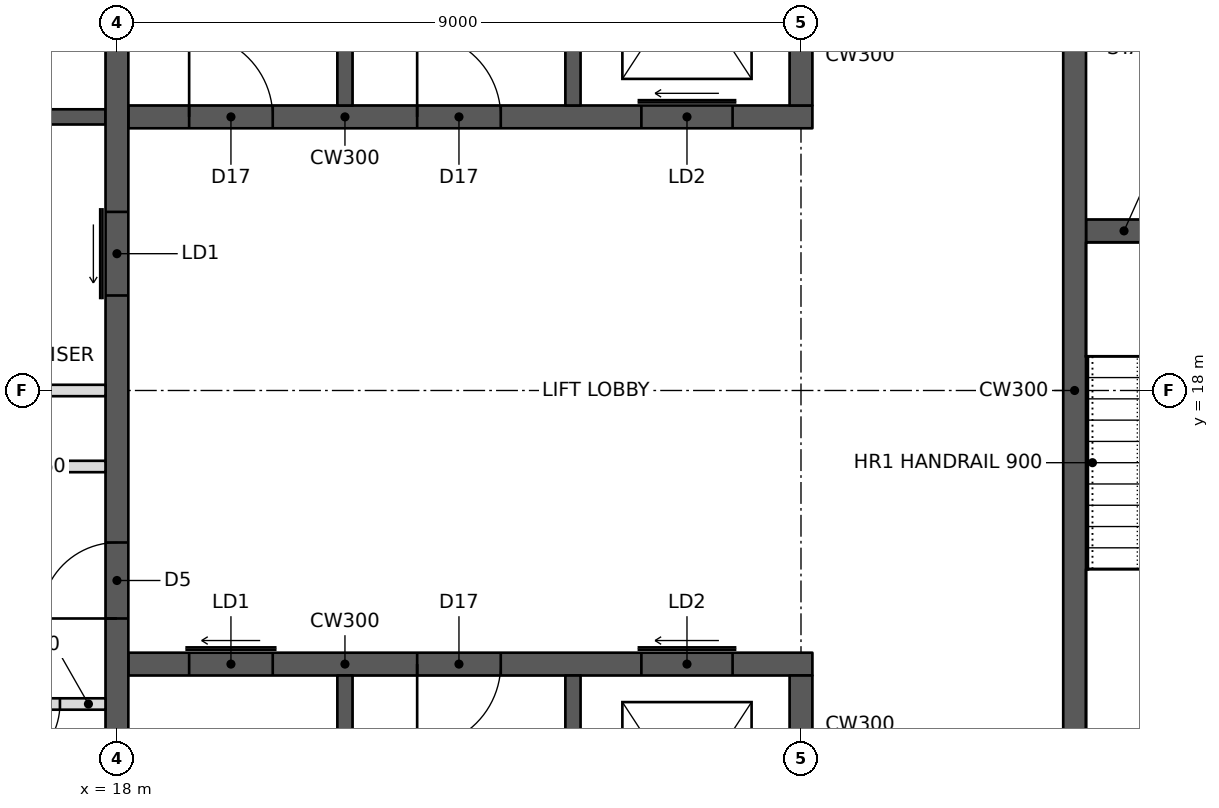
"""IFC4 building model, lengths in metres.
Left out: names, types, materials, properties, quantities, classifications, styles, units other than length and angle.
Written with IfcOpenShell. Run it as: python <this file> out.ifc"""

import sys

from ifc_helpers import new_model, si_unit, direction, frame, frame_2d, origin, place, context, subcontext, project, spatial, rectangle, extrude, element, fill, save


model = new_model("IFC4")
c1 = context("Model", 3, precision=1e-05, world=origin(), true_north=direction((0.0, 1.0)))
c2 = subcontext(c1, "Body", "Model", "MODEL_VIEW")
j1 = project(units=[si_unit("LENGTHUNIT", "METRE"), si_unit("PLANEANGLEUNIT", "RADIAN")], contexts=[c1])
p1 = place(None, origin())
s1 = spatial("IfcSite", under=j1, at=p1, CompositionType="ELEMENT")
p2 = place(p1, origin())
s2 = spatial("IfcBuilding", under=s1, at=p2, CompositionType="ELEMENT")
p3 = place(p2, frame((0.0, 0.0, 241.0)))
s3 = spatial("IfcBuildingStorey", under=s2, at=p3, CompositionType="ELEMENT", Elevation=241.0)
p4 = place(p3, frame((18.0, 11.4, 0.0), z_axis=(0.0, 0.0, 1.0), x_axis=(0.0, 1.0, 0.0)))
e1 = element("IfcWall", 1, at=p4, inside=s3, PredefinedType="SHEAR", context=c2, shape_type="SweptSolid", body=[
    extrude(rectangle(XDim=13.2, YDim=0.3, at=frame_2d((6.6, 0.0))), origin(), (0.0, 0.0, 1.0), 3.6),
])
p5 = place(p4, frame((3.6, 0.0, 0.0)))
e2 = element("IfcOpeningElement", 2, at=p5, cuts=e1, PredefinedType="OPENING", context=c2, shape_type="SweptSolid", body=[
    extrude(rectangle(XDim=1.0, YDim=2.1, at=frame_2d((0.5, 1.05))), frame((0.0, 0.16, 0.0), z_axis=(0.0, -1.0, 0.0), x_axis=(1.0, 0.0, 0.0)), (0.0, 0.0, 1.0), 0.32),
])
p6 = place(p4, frame((7.85, 0.0, 0.0)))
e3 = element("IfcOpeningElement", 3, at=p6, cuts=e1, PredefinedType="OPENING", context=c2, shape_type="SweptSolid", body=[
    extrude(rectangle(XDim=1.1, YDim=2.1, at=frame_2d((0.55, 1.05))), frame((0.0, 0.16, 0.0), z_axis=(0.0, -1.0, 0.0), x_axis=(1.0, 0.0, 0.0)), (0.0, 0.0, 1.0), 0.32),
])
p7 = place(p3, frame((14.55, 18.0, 0.0), z_axis=(0.0, 0.0, 1.0), x_axis=(1.0, 0.0, 0.0)))
e4 = element("IfcWall", 4, at=p7, inside=s3, PredefinedType="PARTITIONING", context=c2, shape_type="SweptSolid", body=[
    extrude(rectangle(XDim=3.3, YDim=0.15, at=frame_2d((1.65, 0.0))), origin(), (0.0, 0.0, 1.0), 3.4),
])
p8 = place(p3, frame((18.15, 14.4, 0.0), z_axis=(0.0, 0.0, 1.0), x_axis=(1.0, 0.0, 0.0)))
e5 = element("IfcWall", 5, at=p8, inside=s3, PredefinedType="SHEAR", context=c2, shape_type="SweptSolid", body=[
    extrude(rectangle(XDim=9.0, YDim=0.3, at=frame_2d((4.5, 0.0))), origin(), (0.0, 0.0, 1.0), 3.6),
])
p9 = place(p8, frame((0.8, 0.0, 0.0)))
e6 = element("IfcOpeningElement", 6, at=p9, cuts=e5, PredefinedType="OPENING", context=c2, shape_type="SweptSolid", body=[
    extrude(rectangle(XDim=1.1, YDim=2.1, at=frame_2d((0.55, 1.05))), frame((0.0, 0.16, 0.0), z_axis=(0.0, -1.0, 0.0), x_axis=(1.0, 0.0, 0.0)), (0.0, 0.0, 1.0), 0.32),
])
p10 = place(p8, frame((6.75, 0.0, 0.0)))
e7 = element("IfcOpeningElement", 7, at=p10, cuts=e5, PredefinedType="OPENING", context=c2, shape_type="SweptSolid", body=[
    extrude(rectangle(XDim=1.2, YDim=2.1, at=frame_2d((0.6, 1.05))), frame((0.0, 0.16, 0.0), z_axis=(0.0, -1.0, 0.0), x_axis=(1.0, 0.0, 0.0)), (0.0, 0.0, 1.0), 0.32),
])
p11 = place(p8, frame((3.8, 0.0, 0.0)))
e8 = element("IfcOpeningElement", 8, at=p11, cuts=e5, PredefinedType="OPENING", context=c2, shape_type="SweptSolid", body=[
    extrude(rectangle(XDim=1.1, YDim=2.1, at=frame_2d((0.55, 1.05))), frame((0.0, 0.16, 0.0), z_axis=(0.0, -1.0, 0.0), x_axis=(1.0, 0.0, 0.0)), (0.0, 0.0, 1.0), 0.32),
])
p12 = place(p3, frame((27.0, 11.4, 0.0), z_axis=(0.0, 0.0, 1.0), x_axis=(0.0, 1.0, 0.0)))
e9 = element("IfcWall", 9, at=p12, inside=s3, PredefinedType="SHEAR", context=c2, shape_type="SweptSolid", body=[
    extrude(rectangle(XDim=2.85, YDim=0.3, at=frame_2d((1.425, 0.0))), origin(), (0.0, 0.0, 1.0), 3.6),
])
for number, where, z_axis, x_axis in (
    (10, (21.0, 11.4, 0.0), (0.0, 0.0, 1.0), (0.0, 1.0, 0.0)),
    (11, (24.0, 11.4, 0.0), (0.0, 0.0, 1.0), (0.0, 1.0, 0.0)),
):
    element("IfcWall", number, at=place(p3, frame(where, z_axis=z_axis, x_axis=x_axis)), inside=s3, PredefinedType="SHEAR", context=c2, shape_type="SweptSolid", body=[
        extrude(rectangle(XDim=2.85, YDim=0.2, at=frame_2d((1.425, 0.0))), origin(), (0.0, 0.0, 1.0), 3.6),
    ])
p13 = place(p3, frame((18.15, 21.6, 0.0), z_axis=(0.0, 0.0, 1.0), x_axis=(1.0, 0.0, 0.0)))
e12 = element("IfcWall", 12, at=p13, inside=s3, PredefinedType="SHEAR", context=c2, shape_type="SweptSolid", body=[
    extrude(rectangle(XDim=9.0, YDim=0.3, at=frame_2d((4.5, 0.0))), origin(), (0.0, 0.0, 1.0), 3.6),
])
p14 = place(p13, frame((6.75, 0.0, 0.0)))
e13 = element("IfcOpeningElement", 13, at=p14, cuts=e12, PredefinedType="OPENING", context=c2, shape_type="SweptSolid", body=[
    extrude(rectangle(XDim=1.2, YDim=2.1, at=frame_2d((0.6, 1.05))), frame((0.0, 0.16, 0.0), z_axis=(0.0, -1.0, 0.0), x_axis=(1.0, 0.0, 0.0)), (0.0, 0.0, 1.0), 0.32),
])
p15 = place(p13, frame((0.8, 0.0, 0.0)))
e14 = element("IfcOpeningElement", 14, at=p15, cuts=e12, PredefinedType="OPENING", context=c2, shape_type="SweptSolid", body=[
    extrude(rectangle(XDim=1.1, YDim=2.1, at=frame_2d((0.55, 1.05))), frame((0.0, 0.16, 0.0), z_axis=(0.0, -1.0, 0.0), x_axis=(1.0, 0.0, 0.0)), (0.0, 0.0, 1.0), 0.32),
])
p16 = place(p13, frame((3.8, 0.0, 0.0)))
e15 = element("IfcOpeningElement", 15, at=p16, cuts=e12, PredefinedType="OPENING", context=c2, shape_type="SweptSolid", body=[
    extrude(rectangle(XDim=1.1, YDim=2.1, at=frame_2d((0.55, 1.05))), frame((0.0, 0.16, 0.0), z_axis=(0.0, -1.0, 0.0), x_axis=(1.0, 0.0, 0.0)), (0.0, 0.0, 1.0), 0.32),
])
p17 = place(p3, frame((27.0, 21.75, 0.0), z_axis=(0.0, 0.0, 1.0), x_axis=(0.0, 1.0, 0.0)))
e16 = element("IfcWall", 16, at=p17, inside=s3, PredefinedType="SHEAR", context=c2, shape_type="SweptSolid", body=[
    extrude(rectangle(XDim=2.85, YDim=0.3, at=frame_2d((1.425, 0.0))), origin(), (0.0, 0.0, 1.0), 3.6),
])
for number, where, z_axis, x_axis in (
    (17, (21.0, 21.75, 0.0), (0.0, 0.0, 1.0), (0.0, 1.0, 0.0)),
    (18, (24.0, 21.75, 0.0), (0.0, 0.0, 1.0), (0.0, 1.0, 0.0)),
):
    element("IfcWall", number, at=place(p3, frame(where, z_axis=z_axis, x_axis=x_axis)), inside=s3, PredefinedType="SHEAR", context=c2, shape_type="SweptSolid", body=[
        extrude(rectangle(XDim=2.85, YDim=0.2, at=frame_2d((1.425, 0.0))), origin(), (0.0, 0.0, 1.0), 3.6),
    ])
p18 = place(p3, frame((30.6, 11.4, 0.0), z_axis=(0.0, 0.0, 1.0), x_axis=(0.0, 1.0, 0.0)))
e19 = element("IfcWall", 19, at=p18, inside=s3, PredefinedType="SHEAR", context=c2, shape_type="SweptSolid", body=[
    extrude(rectangle(XDim=13.2, YDim=0.3, at=frame_2d((6.6, 0.0))), origin(), (0.0, 0.0, 1.0), 3.6),
])
p19 = place(p3, frame((30.75, 20.1, 0.0), z_axis=(0.0, 0.0, 1.0), x_axis=(1.0, 0.0, 0.0)))
e20 = element("IfcWall", 20, at=p19, inside=s3, PredefinedType="SHEAR", context=c2, shape_type="SweptSolid", body=[
    extrude(rectangle(XDim=2.85, YDim=0.3, at=frame_2d((1.425, 0.0))), origin(), (0.0, 0.0, 1.0), 3.6),
])
p20 = place(p19, frame((1.15, 0.0, 0.0)))
e21 = element("IfcOpeningElement", 21, at=p20, cuts=e20, PredefinedType="OPENING", context=c2, shape_type="SweptSolid", body=[
    extrude(rectangle(XDim=1.0, YDim=2.1, at=frame_2d((0.5, 1.05))), frame((0.0, 0.16, 0.0), z_axis=(0.0, -1.0, 0.0), x_axis=(1.0, 0.0, 0.0)), (0.0, 0.0, 1.0), 0.32),
])
p21 = place(p3, frame((14.55, 21.6, 0.0), z_axis=(0.0, 0.0, 1.0), x_axis=(1.0, 0.0, 0.0)))
e22 = element("IfcWall", 22, at=p21, inside=s3, PredefinedType="SHEAR", context=c2, shape_type="SweptSolid", body=[
    extrude(rectangle(XDim=3.3, YDim=0.2, at=frame_2d((1.65, 0.0))), origin(), (0.0, 0.0, 1.0), 3.6),
])
p22 = place(p3, frame((14.55, 17.0, 0.0), z_axis=(0.0, 0.0, 1.0), x_axis=(1.0, 0.0, 0.0)))
e23 = element("IfcWall", 23, at=p22, inside=s3, PredefinedType="PARTITIONING", context=c2, shape_type="SweptSolid", body=[
    extrude(rectangle(XDim=3.3, YDim=0.15, at=frame_2d((1.65, 0.0))), origin(), (0.0, 0.0, 1.0), 3.4),
])
p23 = place(p22, frame((0.3, 0.0, 0.0)))
e24 = element("IfcOpeningElement", 24, at=p23, cuts=e23, PredefinedType="OPENING", context=c2, shape_type="SweptSolid", body=[
    extrude(rectangle(XDim=1.0, YDim=2.1, at=frame_2d((0.5, 1.05))), frame((0.0, 0.085, 0.0), z_axis=(0.0, -1.0, 0.0), x_axis=(1.0, 0.0, 0.0)), (0.0, 0.0, 1.0), 0.17),
])
p24 = place(p3, frame((14.55, 13.875, 0.0), z_axis=(0.0, 0.0, 1.0), x_axis=(1.0, 0.0, 0.0)))
e25 = element("IfcWall", 25, at=p24, inside=s3, PredefinedType="PARTITIONING", context=c2, shape_type="SweptSolid", body=[
    extrude(rectangle(XDim=3.3, YDim=0.15, at=frame_2d((1.65, 0.0))), origin(), (0.0, 0.0, 1.0), 3.4),
])
p25 = place(p24, frame((0.2, 0.0, 0.0)))
e26 = element("IfcOpeningElement", 26, at=p25, cuts=e25, PredefinedType="OPENING", context=c2, shape_type="SweptSolid", body=[
    extrude(rectangle(XDim=0.9, YDim=2.1, at=frame_2d((0.45, 1.05))), frame((0.0, 0.085, 0.0), z_axis=(0.0, -1.0, 0.0), x_axis=(1.0, 0.0, 0.0)), (0.0, 0.0, 1.0), 0.17),
])
p26 = place(p24, frame((1.8, 0.0, 0.0)))
e27 = element("IfcOpeningElement", 27, at=p26, cuts=e25, PredefinedType="OPENING", context=c2, shape_type="SweptSolid", body=[
    extrude(rectangle(XDim=0.9, YDim=2.1, at=frame_2d((0.45, 1.05))), frame((0.0, 0.085, 0.0), z_axis=(0.0, -1.0, 0.0), x_axis=(1.0, 0.0, 0.0)), (0.0, 0.0, 1.0), 0.17),
])
p27 = place(p26, frame((0.9, 0.0, 0.0), z_axis=(0.0, 0.0, 1.0), x_axis=(-1.0, 0.0, 0.0)))
e28 = element("IfcDoor", 28, at=p27, inside=s3, OperationType="SINGLE_SWING_RIGHT", PredefinedType="DOOR", context=c2, shape_type="SweptSolid", body=[
    extrude(rectangle(XDim=0.9, YDim=2.1, at=frame_2d((0.45, 1.05))), frame((0.0, 0.025, 0.0), z_axis=(0.0, -1.0, 0.0), x_axis=(1.0, 0.0, 0.0)), (0.0, 0.0, 1.0), 0.05),
])
fill(e27, e28)
p28 = place(p5, origin())
e29 = element("IfcDoor", 29, at=p28, inside=s3, OperationType="SINGLE_SWING_LEFT", PredefinedType="DOOR", context=c2, shape_type="SweptSolid", body=[
    extrude(rectangle(XDim=1.0, YDim=2.1, at=frame_2d((0.5, 1.05))), frame((0.0, 0.025, 0.0), z_axis=(0.0, -1.0, 0.0), x_axis=(1.0, 0.0, 0.0)), (0.0, 0.0, 1.0), 0.05),
])
fill(e2, e29)
p29 = place(p9, origin())
e30 = element("IfcDoor", 30, at=p29, inside=s3, OperationType="SLIDING_TO_LEFT", PredefinedType="DOOR", context=c2, shape_type="SweptSolid", body=[
    extrude(rectangle(XDim=1.1, YDim=2.1, at=frame_2d((0.55, 1.05))), frame((0.0, 0.025, 0.0), z_axis=(0.0, -1.0, 0.0), x_axis=(1.0, 0.0, 0.0)), (0.0, 0.0, 1.0), 0.05),
])
fill(e6, e30)
p30 = place(p6, origin())
e31 = element("IfcDoor", 31, at=p30, inside=s3, OperationType="SLIDING_TO_LEFT", PredefinedType="DOOR", context=c2, shape_type="SweptSolid", body=[
    extrude(rectangle(XDim=1.1, YDim=2.1, at=frame_2d((0.55, 1.05))), frame((0.0, 0.025, 0.0), z_axis=(0.0, -1.0, 0.0), x_axis=(1.0, 0.0, 0.0)), (0.0, 0.0, 1.0), 0.05),
])
fill(e3, e31)
p31 = place(p10, origin())
e32 = element("IfcDoor", 32, at=p31, inside=s3, OperationType="SLIDING_TO_LEFT", PredefinedType="DOOR", context=c2, shape_type="SweptSolid", body=[
    extrude(rectangle(XDim=1.2, YDim=2.1, at=frame_2d((0.6, 1.05))), frame((0.0, 0.025, 0.0), z_axis=(0.0, -1.0, 0.0), x_axis=(1.0, 0.0, 0.0)), (0.0, 0.0, 1.0), 0.05),
])
fill(e7, e32)
p32 = place(p14, origin())
e33 = element("IfcDoor", 33, at=p32, inside=s3, OperationType="SLIDING_TO_LEFT", PredefinedType="DOOR", context=c2, shape_type="SweptSolid", body=[
    extrude(rectangle(XDim=1.2, YDim=2.1, at=frame_2d((0.6, 1.05))), frame((0.0, 0.025, 0.0), z_axis=(0.0, -1.0, 0.0), x_axis=(1.0, 0.0, 0.0)), (0.0, 0.0, 1.0), 0.05),
])
fill(e13, e33)
p33 = place(p15, origin())
e34 = element("IfcDoor", 34, at=p33, inside=s3, OperationType="SINGLE_SWING_LEFT", PredefinedType="DOOR", context=c2, shape_type="SweptSolid", body=[
    extrude(rectangle(XDim=1.1, YDim=2.1, at=frame_2d((0.55, 1.05))), frame((0.0, 0.025, 0.0), z_axis=(0.0, -1.0, 0.0), x_axis=(1.0, 0.0, 0.0)), (0.0, 0.0, 1.0), 0.05),
])
fill(e14, e34)
p34 = place(p16, origin())
e35 = element("IfcDoor", 35, at=p34, inside=s3, OperationType="SINGLE_SWING_LEFT", PredefinedType="DOOR", context=c2, shape_type="SweptSolid", body=[
    extrude(rectangle(XDim=1.1, YDim=2.1, at=frame_2d((0.55, 1.05))), frame((0.0, 0.025, 0.0), z_axis=(0.0, -1.0, 0.0), x_axis=(1.0, 0.0, 0.0)), (0.0, 0.0, 1.0), 0.05),
])
fill(e15, e35)
p35 = place(p11, frame((1.1, 0.0, 0.0), z_axis=(0.0, 0.0, 1.0), x_axis=(-1.0, 0.0, 0.0)))
e36 = element("IfcDoor", 36, at=p35, inside=s3, OperationType="SINGLE_SWING_RIGHT", PredefinedType="DOOR", context=c2, shape_type="SweptSolid", body=[
    extrude(rectangle(XDim=1.1, YDim=2.1, at=frame_2d((0.55, 1.05))), frame((0.0, 0.025, 0.0), z_axis=(0.0, -1.0, 0.0), x_axis=(1.0, 0.0, 0.0)), (0.0, 0.0, 1.0), 0.05),
])
fill(e8, e36)
save(model, sys.argv[1])
